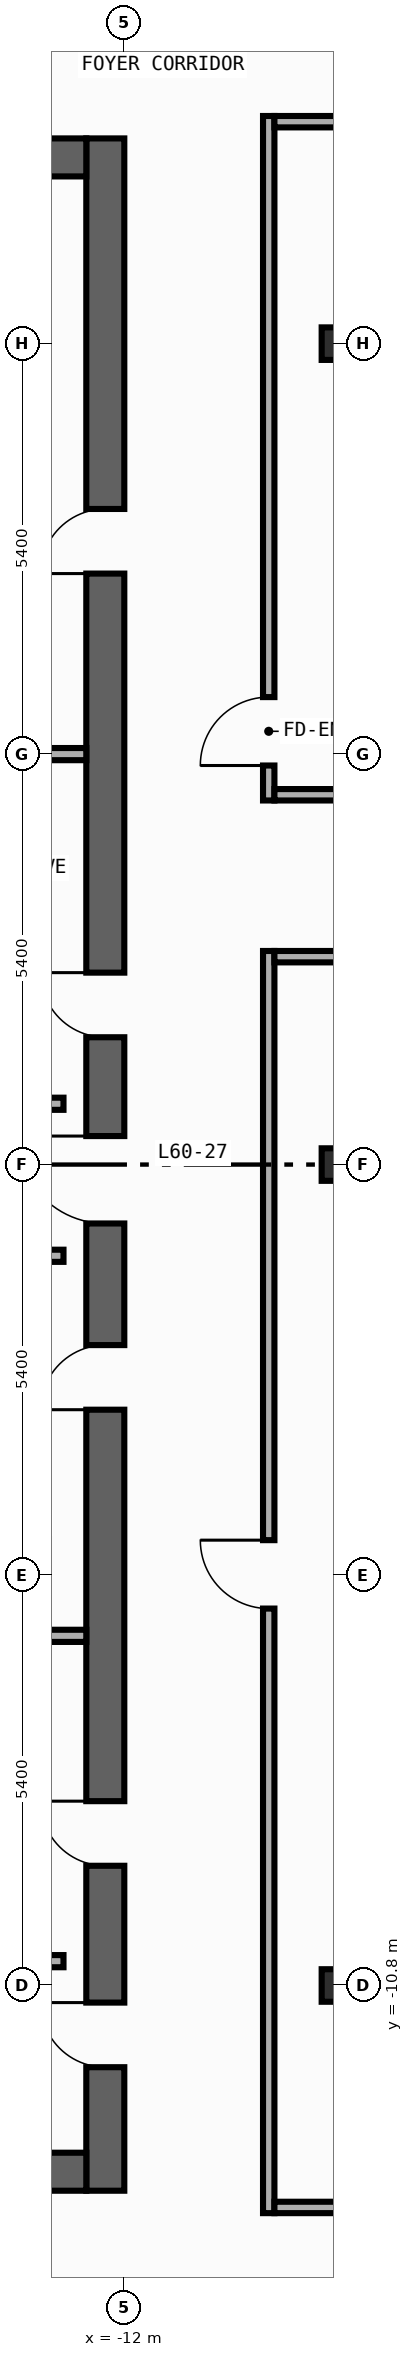
"""IFC4 building model, lengths in metres.
Left out: names, types, materials, properties, quantities, classifications, styles, units other than length and angle.
Written with IfcOpenShell. Run it as: python <this file> out.ifc"""

import sys

from ifc_helpers import new_model, si_unit, direction, frame, frame_2d, origin, origin_2d, place, context, subcontext, project, spatial, rectangle, i_section, extrude, element, fill, save


model = new_model("IFC4")
c1 = context("Model", 3, precision=1e-05, world=origin(), true_north=direction((0.0, 1.0)))
c2 = subcontext(c1, "Body", "Model", "MODEL_VIEW")
j1 = project(units=[si_unit("LENGTHUNIT", "METRE"), si_unit("PLANEANGLEUNIT", "RADIAN")], contexts=[c1])
p1 = place(None, origin())
s1 = spatial("IfcSite", under=j1, at=p1, CompositionType="ELEMENT")
p2 = place(p1, origin())
s2 = spatial("IfcBuilding", under=s1, at=p2, CompositionType="ELEMENT")
p3 = place(p2, frame((0.0, 0.0, 254.8)))
s3 = spatial("IfcBuildingStorey", under=s2, at=p3, CompositionType="ELEMENT", Elevation=254.8)
p4 = place(p3, frame((-12.25, -13.5, 0.0), z_axis=(0.0, 0.0, 1.0), x_axis=(0.0, 1.0, 0.0)))
e1 = element("IfcWall", 1, at=p4, inside=s3, PredefinedType="SHEAR", context=c2, shape_type="SweptSolid", body=[
    extrude(rectangle(XDim=27.0, YDim=0.5, at=frame_2d((13.5, 0.0))), origin(), (0.0, 0.0, 1.0), 3.34),
])
p5 = place(p4, frame((15.175, 0.0, 0.0)))
e2 = element("IfcOpeningElement", 2, at=p5, cuts=e1, PredefinedType="OPENING", context=c2, shape_type="SweptSolid", body=[
    extrude(rectangle(XDim=0.85, YDim=2.1, at=frame_2d((0.425, 1.05))), frame((0.0, 0.26, 0.0), z_axis=(0.0, -1.0, 0.0), x_axis=(1.0, 0.0, 0.0)), (0.0, 0.0, 1.0), 0.52),
])
p6 = place(p4, frame((21.275, 0.0, 0.0)))
e3 = element("IfcOpeningElement", 3, at=p6, cuts=e1, PredefinedType="OPENING", context=c2, shape_type="SweptSolid", body=[
    extrude(rectangle(XDim=0.85, YDim=2.1, at=frame_2d((0.425, 1.05))), frame((0.0, 0.26, 0.0), z_axis=(0.0, -1.0, 0.0), x_axis=(1.0, 0.0, 0.0)), (0.0, 0.0, 1.0), 0.52),
])
p7 = place(p4, frame((4.275, 0.0, 0.0)))
e4 = element("IfcOpeningElement", 4, at=p7, cuts=e1, PredefinedType="OPENING", context=c2, shape_type="SweptSolid", body=[
    extrude(rectangle(XDim=0.85, YDim=2.1, at=frame_2d((0.425, 1.05))), frame((0.0, 0.26, 0.0), z_axis=(0.0, -1.0, 0.0), x_axis=(1.0, 0.0, 0.0)), (0.0, 0.0, 1.0), 0.52),
])
p8 = place(p4, frame((10.275, 0.0, 0.0)))
e5 = element("IfcOpeningElement", 5, at=p8, cuts=e1, PredefinedType="OPENING", context=c2, shape_type="SweptSolid", body=[
    extrude(rectangle(XDim=0.85, YDim=2.1, at=frame_2d((0.425, 1.05))), frame((0.0, 0.26, 0.0), z_axis=(0.0, -1.0, 0.0), x_axis=(1.0, 0.0, 0.0)), (0.0, 0.0, 1.0), 0.52),
])
p9 = place(p4, frame((12.725, 0.0, 0.0)))
e6 = element("IfcOpeningElement", 6, at=p9, cuts=e1, PredefinedType="OPENING", context=c2, shape_type="SweptSolid", body=[
    extrude(rectangle(XDim=1.15, YDim=2.2, at=frame_2d((0.575, 1.1))), frame((0.0, 0.26, 0.0), z_axis=(0.0, -1.0, 0.0), x_axis=(1.0, 0.0, 0.0)), (0.0, 0.0, 1.0), 0.52),
])
p10 = place(p4, frame((1.625, 0.0, 0.0)))
e7 = element("IfcOpeningElement", 7, at=p10, cuts=e1, PredefinedType="OPENING", context=c2, shape_type="SweptSolid", body=[
    extrude(rectangle(XDim=0.85, YDim=2.1, at=frame_2d((0.425, 1.05))), frame((0.0, 0.26, 0.0), z_axis=(0.0, -1.0, 0.0), x_axis=(1.0, 0.0, 0.0)), (0.0, 0.0, 1.0), 0.52),
])
for number, where, z_axis, x_axis in (
    (8, (-19.9, -13.25, 0.0), (0.0, 0.0, 1.0), (1.0, 0.0, 0.0)),
    (9, (-19.9, 13.25, 0.0), (0.0, 0.0, 1.0), (1.0, 0.0, 0.0)),
):
    element("IfcWall", number, at=place(p3, frame(where, z_axis=z_axis, x_axis=x_axis)), inside=s3, PredefinedType="SHEAR", context=c2, shape_type="SweptSolid", body=[
        extrude(rectangle(XDim=7.4, YDim=0.5, at=frame_2d((3.7, 0.0))), origin(), (0.0, 0.0, 1.0), 3.34),
    ])
for number, where, z_axis, x_axis in (
    (10, (-9.2, -10.8, 0.0), (0.0, 0.0, 1.0), (1.0, 0.0, 0.0)),
    (11, (-9.2, 0.0, 0.0), (0.0, 0.0, 1.0), (1.0, 0.0, 0.0)),
    (12, (-9.2, 10.8, 0.0), (0.0, 0.0, 1.0), (1.0, 0.0, 0.0)),
):
    element("IfcColumn", number, at=place(p3, frame(where, z_axis=z_axis, x_axis=x_axis)), inside=s3, PredefinedType="COLUMN", context=c2, shape_type="SweptSolid", body=[
        extrude(i_section(OverallWidth=0.407, OverallDepth=0.428, WebThickness=0.02, FlangeThickness=0.035, FilletRadius=0.022, at=origin_2d()), origin(), (0.0, 0.0, 1.0), 3.6),
    ])
for number, where, z_axis, x_axis in (
    (13, (-15.4, 0.8, 0.0), (0.0, 0.0, 1.0), (1.0, 0.0, 0.0)),
    (14, (-15.4, -1.2, 0.0), (0.0, 0.0, 1.0), (1.0, 0.0, 0.0)),
    (15, (-15.4, -10.48, 0.0), (0.0, 0.0, 1.0), (1.0, 0.0, 0.0)),
):
    element("IfcWall", number, at=place(p3, frame(where, z_axis=z_axis, x_axis=x_axis)), inside=s3, PredefinedType="STANDARD", context=c2, shape_type="SweptSolid", body=[
        extrude(rectangle(XDim=2.6, YDim=0.16, at=frame_2d((1.3, 0.0))), origin(), (0.0, 0.0, 1.0), 3.34),
    ])
for number, where, z_axis, x_axis in (
    (16, (-15.4, 5.4, 0.0), (0.0, 0.0, 1.0), (1.0, 0.0, 0.0)),
    (17, (-15.4, -6.2, 0.0), (0.0, 0.0, 1.0), (1.0, 0.0, 0.0)),
):
    element("IfcWall", number, at=place(p3, frame(where, z_axis=z_axis, x_axis=x_axis)), inside=s3, PredefinedType="PARTITIONING", context=c2, shape_type="SweptSolid", body=[
        extrude(rectangle(XDim=2.9, YDim=0.16, at=frame_2d((1.45, 0.0))), origin(), (0.0, 0.0, 1.0), 3.34),
    ])
p11 = place(p3, frame((-10.1, 4.79, 0.0), z_axis=(0.0, 0.0, 1.0), x_axis=(0.0, 1.0, 0.0)))
e18 = element("IfcWall", 18, at=p11, inside=s3, PredefinedType="PARTITIONING", context=c2, shape_type="SweptSolid", body=[
    extrude(rectangle(XDim=9.005, YDim=0.15, at=frame_2d((4.502, 0.0))), origin(), (0.0, 0.0, 1.0), 3.34),
])
p12 = place(p11, frame((0.46, 0.0, 0.0)))
e19 = element("IfcOpeningElement", 19, at=p12, cuts=e18, PredefinedType="OPENING", context=c2, shape_type="SweptSolid", body=[
    extrude(rectangle(XDim=0.9, YDim=2.15, at=frame_2d((0.45, 1.075))), frame((0.0, 0.085, 0.0), z_axis=(0.0, -1.0, 0.0), x_axis=(1.0, 0.0, 0.0)), (0.0, 0.0, 1.0), 0.17),
])
p13 = place(p3, frame((-10.1, -13.795, 0.0), z_axis=(0.0, 0.0, 1.0), x_axis=(0.0, 1.0, 0.0)))
e20 = element("IfcWall", 20, at=p13, inside=s3, PredefinedType="PARTITIONING", context=c2, shape_type="SweptSolid", body=[
    extrude(rectangle(XDim=16.605, YDim=0.15, at=frame_2d((8.302, 0.0))), origin(), (0.0, 0.0, 1.0), 3.34),
])
p14 = place(p13, frame((7.954, 0.0, 0.0)))
e21 = element("IfcOpeningElement", 21, at=p14, cuts=e20, PredefinedType="OPENING", context=c2, shape_type="SweptSolid", body=[
    extrude(rectangle(XDim=0.9, YDim=2.15, at=frame_2d((0.45, 1.075))), frame((0.0, 0.085, 0.0), z_axis=(0.0, -1.0, 0.0), x_axis=(1.0, 0.0, 0.0)), (0.0, 0.0, 1.0), 0.17),
])
p15 = place(p3, frame((-10.025, 4.865, 0.0), z_axis=(0.0, 0.0, 1.0), x_axis=(1.0, 0.0, 0.0)))
e22 = element("IfcWall", 22, at=p15, inside=s3, PredefinedType="PARTITIONING", context=c2, shape_type="SweptSolid", body=[
    extrude(rectangle(XDim=13.055, YDim=0.15, at=frame_2d((6.527, 0.0))), origin(), (0.0, 0.0, 1.0), 3.34),
])
p16 = place(p15, frame((9.488, 0.0, 0.0)))
e23 = element("IfcOpeningElement", 23, at=p16, cuts=e22, PredefinedType="OPENING", context=c2, shape_type="SweptSolid", body=[
    extrude(rectangle(XDim=0.9, YDim=2.15, at=frame_2d((0.45, 1.075))), frame((0.0, 0.085, 0.0), z_axis=(0.0, -1.0, 0.0), x_axis=(1.0, 0.0, 0.0)), (0.0, 0.0, 1.0), 0.17),
])
p17 = place(p3, frame((-10.025, 2.735, 0.0), z_axis=(0.0, 0.0, 1.0), x_axis=(1.0, 0.0, 0.0)))
e24 = element("IfcWall", 24, at=p17, inside=s3, PredefinedType="PARTITIONING", context=c2, shape_type="SweptSolid", body=[
    extrude(rectangle(XDim=13.035, YDim=0.15, at=frame_2d((6.518, 0.0))), origin(), (0.0, 0.0, 1.0), 3.34),
])
p18 = place(p17, frame((9.672, 0.0, 0.0)))
e25 = element("IfcOpeningElement", 25, at=p18, cuts=e24, PredefinedType="OPENING", context=c2, shape_type="SweptSolid", body=[
    extrude(rectangle(XDim=0.9, YDim=2.15, at=frame_2d((0.45, 1.075))), frame((0.0, 0.085, 0.0), z_axis=(0.0, -1.0, 0.0), x_axis=(1.0, 0.0, 0.0)), (0.0, 0.0, 1.0), 0.17),
])
p19 = place(p3, frame((-10.025, 13.72, 0.0), z_axis=(0.0, 0.0, 1.0), x_axis=(1.0, 0.0, 0.0)))
e26 = element("IfcWall", 26, at=p19, inside=s3, PredefinedType="PARTITIONING", context=c2, shape_type="SweptSolid", body=[
    extrude(rectangle(XDim=13.055, YDim=0.15, at=frame_2d((6.527, 0.0))), origin(), (0.0, 0.0, 1.0), 3.34),
])
p20 = place(p19, frame((7.281, 0.0, 0.0)))
e27 = element("IfcOpeningElement", 27, at=p20, cuts=e26, PredefinedType="OPENING", context=c2, shape_type="SweptSolid", body=[
    extrude(rectangle(XDim=0.9, YDim=2.15, at=frame_2d((0.45, 1.075))), frame((0.0, 0.085, 0.0), z_axis=(0.0, -1.0, 0.0), x_axis=(1.0, 0.0, 0.0)), (0.0, 0.0, 1.0), 0.17),
])
p21 = place(p3, frame((-10.025, -13.72, 0.0), z_axis=(0.0, 0.0, 1.0), x_axis=(1.0, 0.0, 0.0)))
e28 = element("IfcWall", 28, at=p21, inside=s3, PredefinedType="PARTITIONING", context=c2, shape_type="SweptSolid", body=[
    extrude(rectangle(XDim=12.885, YDim=0.15, at=frame_2d((6.442, 0.0))), origin(), (0.0, 0.0, 1.0), 3.34),
])
p22 = place(p21, frame((7.3, 0.0, 0.0)))
e29 = element("IfcOpeningElement", 29, at=p22, cuts=e28, PredefinedType="OPENING", context=c2, shape_type="SweptSolid", body=[
    extrude(rectangle(XDim=0.9, YDim=2.15, at=frame_2d((0.45, 1.075))), frame((0.0, 0.085, 0.0), z_axis=(0.0, -1.0, 0.0), x_axis=(1.0, 0.0, 0.0)), (0.0, 0.0, 1.0), 0.17),
])
p23 = place(p5, origin())
e30 = element("IfcDoor", 30, at=p23, inside=s3, OperationType="SINGLE_SWING_RIGHT", PredefinedType="DOOR", context=c2, shape_type="SweptSolid", body=[
    extrude(rectangle(XDim=0.85, YDim=2.1, at=frame_2d((0.425, 1.05))), frame((0.0, 0.025, 0.0), z_axis=(0.0, -1.0, 0.0), x_axis=(1.0, 0.0, 0.0)), (0.0, 0.0, 1.0), 0.05),
])
fill(e2, e30)
p24 = place(p6, origin())
e31 = element("IfcDoor", 31, at=p24, inside=s3, OperationType="SINGLE_SWING_LEFT", PredefinedType="DOOR", context=c2, shape_type="SweptSolid", body=[
    extrude(rectangle(XDim=0.85, YDim=2.1, at=frame_2d((0.425, 1.05))), frame((0.0, 0.025, 0.0), z_axis=(0.0, -1.0, 0.0), x_axis=(1.0, 0.0, 0.0)), (0.0, 0.0, 1.0), 0.05),
])
fill(e3, e31)
p25 = place(p7, origin())
e32 = element("IfcDoor", 32, at=p25, inside=s3, OperationType="SINGLE_SWING_RIGHT", PredefinedType="DOOR", context=c2, shape_type="SweptSolid", body=[
    extrude(rectangle(XDim=0.85, YDim=2.1, at=frame_2d((0.425, 1.05))), frame((0.0, 0.025, 0.0), z_axis=(0.0, -1.0, 0.0), x_axis=(1.0, 0.0, 0.0)), (0.0, 0.0, 1.0), 0.05),
])
fill(e4, e32)
p26 = place(p8, origin())
e33 = element("IfcDoor", 33, at=p26, inside=s3, OperationType="SINGLE_SWING_LEFT", PredefinedType="DOOR", context=c2, shape_type="SweptSolid", body=[
    extrude(rectangle(XDim=0.85, YDim=2.1, at=frame_2d((0.425, 1.05))), frame((0.0, 0.025, 0.0), z_axis=(0.0, -1.0, 0.0), x_axis=(1.0, 0.0, 0.0)), (0.0, 0.0, 1.0), 0.05),
])
fill(e5, e33)
p27 = place(p9, origin())
e34 = element("IfcDoor", 34, at=p27, inside=s3, OperationType="SINGLE_SWING_RIGHT", PredefinedType="DOOR", context=c2, shape_type="SweptSolid", body=[
    extrude(rectangle(XDim=1.15, YDim=2.2, at=frame_2d((0.575, 1.1))), frame((0.0, 0.025, 0.0), z_axis=(0.0, -1.0, 0.0), x_axis=(1.0, 0.0, 0.0)), (0.0, 0.0, 1.0), 0.05),
])
fill(e6, e34)
p28 = place(p10, origin())
e35 = element("IfcDoor", 35, at=p28, inside=s3, OperationType="SINGLE_SWING_RIGHT", PredefinedType="DOOR", context=c2, shape_type="SweptSolid", body=[
    extrude(rectangle(XDim=0.85, YDim=2.1, at=frame_2d((0.425, 1.05))), frame((0.0, 0.025, 0.0), z_axis=(0.0, -1.0, 0.0), x_axis=(1.0, 0.0, 0.0)), (0.0, 0.0, 1.0), 0.05),
])
fill(e7, e35)
p29 = place(p12, origin())
e36 = element("IfcDoor", 36, at=p29, inside=s3, OperationType="SINGLE_SWING_LEFT", PredefinedType="DOOR", context=c2, shape_type="SweptSolid", body=[
    extrude(rectangle(XDim=0.9, YDim=2.15, at=frame_2d((0.45, 1.075))), frame((0.0, 0.025, 0.0), z_axis=(0.0, -1.0, 0.0), x_axis=(1.0, 0.0, 0.0)), (0.0, 0.0, 1.0), 0.05),
])
fill(e19, e36)
p30 = place(p14, origin())
e37 = element("IfcDoor", 37, at=p30, inside=s3, OperationType="SINGLE_SWING_RIGHT", PredefinedType="DOOR", context=c2, shape_type="SweptSolid", body=[
    extrude(rectangle(XDim=0.9, YDim=2.15, at=frame_2d((0.45, 1.075))), frame((0.0, 0.025, 0.0), z_axis=(0.0, -1.0, 0.0), x_axis=(1.0, 0.0, 0.0)), (0.0, 0.0, 1.0), 0.05),
])
fill(e21, e37)
save(model, sys.argv[1])
